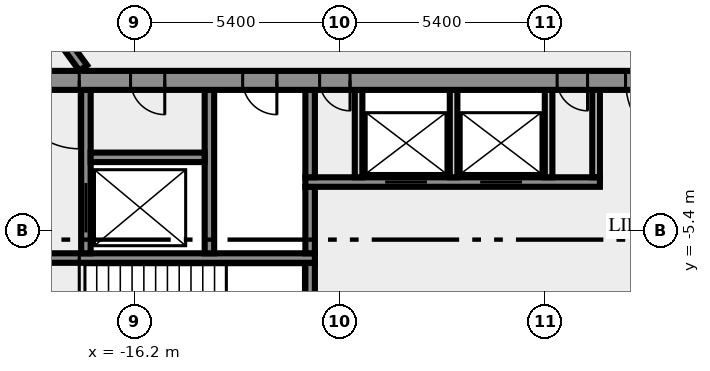
"""IFC4 building model, lengths in metres.
Left out: names, types, materials, properties, quantities, classifications, styles, units other than length and angle.
Written with IfcOpenShell. Run it as: python <this file> out.ifc"""

import sys

from ifc_helpers import new_model, si_unit, direction, frame, frame_2d, origin, place, context, subcontext, project, spatial, rectangle, extrude, element, fill, save


model = new_model("IFC4")
c1 = context("Model", 3, precision=1e-05, world=origin(), true_north=direction((0.0, 1.0)))
c2 = subcontext(c1, "Body", "Model", "MODEL_VIEW")
j1 = project(units=[si_unit("LENGTHUNIT", "METRE"), si_unit("PLANEANGLEUNIT", "RADIAN")], contexts=[c1])
p1 = place(None, origin())
s1 = spatial("IfcSite", under=j1, at=p1, CompositionType="ELEMENT")
p2 = place(p1, origin())
s2 = spatial("IfcBuilding", under=s1, at=p2, CompositionType="ELEMENT")
p3 = place(p2, frame((0.0, 0.0, 293.0)))
s3 = spatial("IfcBuildingStorey", under=s2, at=p3, CompositionType="ELEMENT", Elevation=293.0)
p4 = place(p3, frame((-11.575, -7.25, 0.0), z_axis=(0.0, 0.0, 1.0), x_axis=(0.0, 1.0, 0.0)))
e1 = element("IfcWall", 1, at=p4, inside=s3, PredefinedType="SHEAR", context=c2, shape_type="SweptSolid", body=[
    extrude(rectangle(XDim=1.0, YDim=0.25, at=frame_2d((0.5, 0.0))), origin(), (0.0, 0.0, 1.0), 3.65),
])
p5 = place(p3, frame((-11.45, -6.125, 0.0), z_axis=(0.0, 0.0, 1.0), x_axis=(-1.0, 0.0, 0.0)))
e2 = element("IfcWall", 2, at=p5, inside=s3, PredefinedType="SHEAR", context=c2, shape_type="SweptSolid", body=[
    extrude(rectangle(XDim=8.05, YDim=0.25, at=frame_2d((4.025, 0.0))), origin(), (0.0, 0.0, 1.0), 3.65),
])
p6 = place(p5, frame((6.2, 0.0, 0.0)))
e3 = element("IfcOpeningElement", 3, at=p6, cuts=e2, PredefinedType="OPENING", context=c2, shape_type="SweptSolid", body=[
    extrude(rectangle(XDim=1.8, YDim=2.1, at=frame_2d((0.9, 1.05))), frame((0.0, 0.135, 0.0), z_axis=(0.0, -1.0, 0.0), x_axis=(1.0, 0.0, 0.0)), (0.0, 0.0, 1.0), 0.27),
])
p7 = place(p3, frame((-17.475, -6.0, 0.0), z_axis=(0.0, 0.0, 1.0), x_axis=(0.0, 1.0, 0.0)))
e4 = element("IfcWall", 4, at=p7, inside=s3, PredefinedType="SHEAR", context=c2, shape_type="SweptSolid", body=[
    extrude(rectangle(XDim=4.3, YDim=0.25, at=frame_2d((2.15, 0.0))), origin(), (0.0, 0.0, 1.0), 3.65),
])
p8 = place(p7, frame((0.55, 0.0, 0.0)))
e5 = element("IfcOpeningElement", 5, at=p8, cuts=e4, PredefinedType="OPENING", context=c2, shape_type="SweptSolid", body=[
    extrude(rectangle(XDim=1.3, YDim=2.1, at=frame_2d((0.65, 1.05))), frame((0.0, 0.135, 0.0), z_axis=(0.0, -1.0, 0.0), x_axis=(1.0, 0.0, 0.0)), (0.0, 0.0, 1.0), 0.27),
])
p9 = place(p3, frame((-14.225, -6.0, 0.0), z_axis=(0.0, 0.0, 1.0), x_axis=(0.0, 1.0, 0.0)))
e6 = element("IfcWall", 6, at=p9, inside=s3, PredefinedType="SHEAR", context=c2, shape_type="SweptSolid", body=[
    extrude(rectangle(XDim=4.3, YDim=0.25, at=frame_2d((2.15, 0.0))), origin(), (0.0, 0.0, 1.0), 3.65),
])
p10 = place(p3, frame((-11.575, -6.0, 0.0), z_axis=(0.0, 0.0, 1.0), x_axis=(0.0, 1.0, 0.0)))
e7 = element("IfcWall", 7, at=p10, inside=s3, PredefinedType="SHEAR", context=c2, shape_type="SweptSolid", body=[
    extrude(rectangle(XDim=1.75, YDim=0.25, at=frame_2d((0.875, 0.0))), origin(), (0.0, 0.0, 1.0), 3.65),
])
p11 = place(p3, frame((-11.7, -4.125, 0.0), z_axis=(0.0, 0.0, 1.0), x_axis=(1.0, 0.0, 0.0)))
e8 = element("IfcWall", 8, at=p11, inside=s3, PredefinedType="SHEAR", context=c2, shape_type="SweptSolid", body=[
    extrude(rectangle(XDim=7.75, YDim=0.25, at=frame_2d((3.875, 0.0))), origin(), (0.0, 0.0, 1.0), 3.65),
])
p12 = place(p11, frame((2.1, 0.0, 0.0)))
e9 = element("IfcOpeningElement", 9, at=p12, cuts=e8, PredefinedType="OPENING", context=c2, shape_type="SweptSolid", body=[
    extrude(rectangle(XDim=1.1, YDim=2.1, at=frame_2d((0.55, 1.05))), frame((0.0, 0.135, 0.0), z_axis=(0.0, -1.0, 0.0), x_axis=(1.0, 0.0, 0.0)), (0.0, 0.0, 1.0), 0.27),
])
p13 = place(p11, frame((4.6, 0.0, 0.0)))
e10 = element("IfcOpeningElement", 10, at=p13, cuts=e8, PredefinedType="OPENING", context=c2, shape_type="SweptSolid", body=[
    extrude(rectangle(XDim=1.1, YDim=2.1, at=frame_2d((0.55, 1.05))), frame((0.0, 0.135, 0.0), z_axis=(0.0, -1.0, 0.0), x_axis=(1.0, 0.0, 0.0)), (0.0, 0.0, 1.0), 0.27),
])
p14 = place(p3, frame((-11.575, -4.0, 0.0), z_axis=(0.0, 0.0, 1.0), x_axis=(0.0, 1.0, 0.0)))
e11 = element("IfcWall", 11, at=p14, inside=s3, PredefinedType="SHEAR", context=c2, shape_type="SweptSolid", body=[
    extrude(rectangle(XDim=2.3, YDim=0.25, at=frame_2d((1.15, 0.0))), origin(), (0.0, 0.0, 1.0), 3.65),
])
for number, where, z_axis, x_axis in (
    (12, (-10.3, -4.0, 0.0), (0.0, 0.0, 1.0), (0.0, 1.0, 0.0)),
    (13, (-7.8, -4.0, 0.0), (0.0, 0.0, 1.0), (0.0, 1.0, 0.0)),
    (14, (-5.3, -4.0, 0.0), (0.0, 0.0, 1.0), (0.0, 1.0, 0.0)),
    (15, (-4.05, -4.0, 0.0), (0.0, 0.0, 1.0), (0.0, 1.0, 0.0)),
):
    element("IfcWall", number, at=place(p3, frame(where, z_axis=z_axis, x_axis=x_axis)), inside=s3, PredefinedType="SOLIDWALL", context=c2, shape_type="SweptSolid", body=[
        extrude(rectangle(XDim=2.3, YDim=0.2, at=frame_2d((1.15, 0.0))), origin(), (0.0, 0.0, 1.0), 3.65),
    ])
p15 = place(p3, frame((-17.35, -3.475, 0.0), z_axis=(0.0, 0.0, 1.0), x_axis=(1.0, 0.0, 0.0)))
e16 = element("IfcWall", 16, at=p15, inside=s3, PredefinedType="SHEAR", context=c2, shape_type="SweptSolid", body=[
    extrude(rectangle(XDim=3.0, YDim=0.25, at=frame_2d((1.5, 0.0))), origin(), (0.0, 0.0, 1.0), 3.65),
])
p16 = place(p3, frame((20.49, -1.45, 0.0), z_axis=(0.0, 0.0, 1.0), x_axis=(-1.0, 0.0, 0.0)))
e17 = element("IfcWall", 17, at=p16, inside=s3, PredefinedType="SHEAR", context=c2, shape_type="SweptSolid", body=[
    extrude(rectangle(XDim=40.98, YDim=0.5, at=frame_2d((20.49, 0.0))), origin(), (0.0, 0.0, 1.0), 3.65),
])
p17 = place(p16, frame((38.14, 0.0, 0.0)))
e18 = element("IfcOpeningElement", 18, at=p17, cuts=e17, PredefinedType="OPENING", context=c2, shape_type="SweptSolid", body=[
    extrude(rectangle(XDim=1.8, YDim=2.1, at=frame_2d((0.9, 1.05))), frame((0.0, 0.26, 0.0), z_axis=(0.0, -1.0, 0.0), x_axis=(1.0, 0.0, 0.0)), (0.0, 0.0, 1.0), 0.52),
])
p18 = place(p16, frame((35.89, 0.0, 0.0)))
e19 = element("IfcOpeningElement", 19, at=p18, cuts=e17, PredefinedType="OPENING", context=c2, shape_type="SweptSolid", body=[
    extrude(rectangle(XDim=0.9, YDim=2.1, at=frame_2d((0.45, 1.05))), frame((0.0, 0.26, 0.0), z_axis=(0.0, -1.0, 0.0), x_axis=(1.0, 0.0, 0.0)), (0.0, 0.0, 1.0), 0.52),
])
p19 = place(p16, frame((32.94, 0.0, 0.0)))
e20 = element("IfcOpeningElement", 20, at=p19, cuts=e17, PredefinedType="OPENING", context=c2, shape_type="SweptSolid", body=[
    extrude(rectangle(XDim=0.9, YDim=2.1, at=frame_2d((0.45, 1.05))), frame((0.0, 0.26, 0.0), z_axis=(0.0, -1.0, 0.0), x_axis=(1.0, 0.0, 0.0)), (0.0, 0.0, 1.0), 0.52),
])
p20 = place(p16, frame((31.015, 0.0, 0.0)))
e21 = element("IfcOpeningElement", 21, at=p20, cuts=e17, PredefinedType="OPENING", context=c2, shape_type="SweptSolid", body=[
    extrude(rectangle(XDim=0.8, YDim=2.1, at=frame_2d((0.4, 1.05))), frame((0.0, 0.26, 0.0), z_axis=(0.0, -1.0, 0.0), x_axis=(1.0, 0.0, 0.0)), (0.0, 0.0, 1.0), 0.52),
])
p21 = place(p16, frame((24.765, 0.0, 0.0)))
e22 = element("IfcOpeningElement", 22, at=p21, cuts=e17, PredefinedType="OPENING", context=c2, shape_type="SweptSolid", body=[
    extrude(rectangle(XDim=0.8, YDim=2.1, at=frame_2d((0.4, 1.05))), frame((0.0, 0.26, 0.0), z_axis=(0.0, -1.0, 0.0), x_axis=(1.0, 0.0, 0.0)), (0.0, 0.0, 1.0), 0.52),
])
p22 = place(p16, frame((21.765, 0.0, 0.0)))
e23 = element("IfcOpeningElement", 23, at=p22, cuts=e17, PredefinedType="OPENING", context=c2, shape_type="SweptSolid", body=[
    extrude(rectangle(XDim=2.0, YDim=2.1, at=frame_2d((1.0, 1.05))), frame((0.0, 0.26, 0.0), z_axis=(0.0, -1.0, 0.0), x_axis=(1.0, 0.0, 0.0)), (0.0, 0.0, 1.0), 0.52),
])
p23 = place(p16, frame((15.202, 0.0, 0.0)))
e24 = element("IfcOpeningElement", 24, at=p23, cuts=e17, PredefinedType="OPENING", context=c2, shape_type="SweptSolid", body=[
    extrude(rectangle(XDim=0.9, YDim=2.1, at=frame_2d((0.45, 1.05))), frame((0.0, 0.26, 0.0), z_axis=(0.0, -1.0, 0.0), x_axis=(1.0, 0.0, 0.0)), (0.0, 0.0, 1.0), 0.52),
])
p24 = place(p16, frame((13.54, 0.0, 0.0)))
e25 = element("IfcOpeningElement", 25, at=p24, cuts=e17, PredefinedType="OPENING", context=c2, shape_type="SweptSolid", body=[
    extrude(rectangle(XDim=0.9, YDim=2.1, at=frame_2d((0.45, 1.05))), frame((0.0, 0.26, 0.0), z_axis=(0.0, -1.0, 0.0), x_axis=(1.0, 0.0, 0.0)), (0.0, 0.0, 1.0), 0.52),
])
p25 = place(p16, frame((11.64, 0.0, 0.0)))
e26 = element("IfcOpeningElement", 26, at=p25, cuts=e17, PredefinedType="OPENING", context=c2, shape_type="SweptSolid", body=[
    extrude(rectangle(XDim=0.9, YDim=2.1, at=frame_2d((0.45, 1.05))), frame((0.0, 0.26, 0.0), z_axis=(0.0, -1.0, 0.0), x_axis=(1.0, 0.0, 0.0)), (0.0, 0.0, 1.0), 0.52),
])
p26 = place(p16, frame((9.577, 0.0, 0.0)))
e27 = element("IfcOpeningElement", 27, at=p26, cuts=e17, PredefinedType="OPENING", context=c2, shape_type="SweptSolid", body=[
    extrude(rectangle(XDim=0.9, YDim=2.1, at=frame_2d((0.45, 1.05))), frame((0.0, 0.26, 0.0), z_axis=(0.0, -1.0, 0.0), x_axis=(1.0, 0.0, 0.0)), (0.0, 0.0, 1.0), 0.52),
])
p27 = place(p16, frame((7.14, 0.0, 0.0)))
e28 = element("IfcOpeningElement", 28, at=p27, cuts=e17, PredefinedType="OPENING", context=c2, shape_type="SweptSolid", body=[
    extrude(rectangle(XDim=0.9, YDim=2.1, at=frame_2d((0.45, 1.05))), frame((0.0, 0.26, 0.0), z_axis=(0.0, -1.0, 0.0), x_axis=(1.0, 0.0, 0.0)), (0.0, 0.0, 1.0), 0.52),
])
p28 = place(p16, frame((5.028, 0.0, 0.0)))
e29 = element("IfcOpeningElement", 29, at=p28, cuts=e17, PredefinedType="OPENING", context=c2, shape_type="SweptSolid", body=[
    extrude(rectangle(XDim=0.8, YDim=2.1, at=frame_2d((0.4, 1.05))), frame((0.0, 0.26, 0.0), z_axis=(0.0, -1.0, 0.0), x_axis=(1.0, 0.0, 0.0)), (0.0, 0.0, 1.0), 0.52),
])
p29 = place(p16, frame((3.452, 0.0, 0.0)))
e30 = element("IfcOpeningElement", 30, at=p29, cuts=e17, PredefinedType="OPENING", context=c2, shape_type="SweptSolid", body=[
    extrude(rectangle(XDim=0.8, YDim=2.1, at=frame_2d((0.4, 1.05))), frame((0.0, 0.26, 0.0), z_axis=(0.0, -1.0, 0.0), x_axis=(1.0, 0.0, 0.0)), (0.0, 0.0, 1.0), 0.52),
])
p30 = place(p16, frame((1.04, 0.0, 0.0)))
e31 = element("IfcOpeningElement", 31, at=p30, cuts=e17, PredefinedType="OPENING", context=c2, shape_type="SweptSolid", body=[
    extrude(rectangle(XDim=1.8, YDim=2.1, at=frame_2d((0.9, 1.05))), frame((0.0, 0.26, 0.0), z_axis=(0.0, -1.0, 0.0), x_axis=(1.0, 0.0, 0.0)), (0.0, 0.0, 1.0), 0.52),
])
p31 = place(p3, frame((-24.865, 8.95, 0.0), z_axis=(0.0, 0.0, 1.0), x_axis=(0.587791617212, -0.809012369952, 0.0)))
e32 = element("IfcWall", 32, at=p31, inside=s3, PredefinedType="SOLIDWALL", context=c2, shape_type="SweptSolid", body=[
    extrude(rectangle(XDim=12.453, YDim=0.25, at=frame_2d((6.227, 0.0))), origin(), (0.0, 0.0, 1.0), 3.65),
])
p32 = place(p31, frame((8.112, 0.0, 0.0)))
e33 = element("IfcOpeningElement", 33, at=p32, cuts=e32, PredefinedType="OPENING", context=c2, shape_type="SweptSolid", body=[
    extrude(rectangle(XDim=0.9, YDim=2.1, at=frame_2d((0.45, 1.05))), frame((0.0, 0.135, 0.0), z_axis=(0.0, -1.0, 0.0), x_axis=(1.0, 0.0, 0.0)), (0.0, 0.0, 1.0), 0.27),
])
p33 = place(p6, origin())
e34 = element("IfcDoor", 34, at=p33, inside=s3, OperationType="DOUBLE_DOOR_SINGLE_SWING", PredefinedType="DOOR", context=c2, shape_type="SweptSolid", body=[
    extrude(rectangle(XDim=1.8, YDim=2.1, at=frame_2d((0.9, 1.05))), frame((0.0, 0.025, 0.0), z_axis=(0.0, -1.0, 0.0), x_axis=(1.0, 0.0, 0.0)), (0.0, 0.0, 1.0), 0.05),
])
fill(e3, e34)
p34 = place(p8, origin())
e35 = element("IfcDoor", 35, at=p34, inside=s3, OperationType="DOUBLE_DOOR_SLIDING", PredefinedType="DOOR", context=c2, shape_type="SweptSolid", body=[
    extrude(rectangle(XDim=1.3, YDim=2.1, at=frame_2d((0.65, 1.05))), frame((0.0, 0.025, 0.0), z_axis=(0.0, -1.0, 0.0), x_axis=(1.0, 0.0, 0.0)), (0.0, 0.0, 1.0), 0.05),
])
fill(e5, e35)
p35 = place(p12, origin())
e36 = element("IfcDoor", 36, at=p35, inside=s3, OperationType="DOUBLE_DOOR_SLIDING", PredefinedType="DOOR", context=c2, shape_type="SweptSolid", body=[
    extrude(rectangle(XDim=1.1, YDim=2.1, at=frame_2d((0.55, 1.05))), frame((0.0, 0.025, 0.0), z_axis=(0.0, -1.0, 0.0), x_axis=(1.0, 0.0, 0.0)), (0.0, 0.0, 1.0), 0.05),
])
fill(e9, e36)
p36 = place(p13, origin())
e37 = element("IfcDoor", 37, at=p36, inside=s3, OperationType="DOUBLE_DOOR_SLIDING", PredefinedType="DOOR", context=c2, shape_type="SweptSolid", body=[
    extrude(rectangle(XDim=1.1, YDim=2.1, at=frame_2d((0.55, 1.05))), frame((0.0, 0.025, 0.0), z_axis=(0.0, -1.0, 0.0), x_axis=(1.0, 0.0, 0.0)), (0.0, 0.0, 1.0), 0.05),
])
fill(e10, e37)
p37 = place(p17, origin())
e38 = element("IfcDoor", 38, at=p37, inside=s3, OperationType="DOUBLE_DOOR_SINGLE_SWING", PredefinedType="DOOR", context=c2, shape_type="SweptSolid", body=[
    extrude(rectangle(XDim=1.8, YDim=2.1, at=frame_2d((0.9, 1.05))), frame((0.0, 0.025, 0.0), z_axis=(0.0, -1.0, 0.0), x_axis=(1.0, 0.0, 0.0)), (0.0, 0.0, 1.0), 0.05),
])
fill(e18, e38)
p38 = place(p18, origin())
e39 = element("IfcDoor", 39, at=p38, inside=s3, OperationType="SINGLE_SWING_RIGHT", PredefinedType="DOOR", context=c2, shape_type="SweptSolid", body=[
    extrude(rectangle(XDim=0.9, YDim=2.1, at=frame_2d((0.45, 1.05))), frame((0.0, 0.025, 0.0), z_axis=(0.0, -1.0, 0.0), x_axis=(1.0, 0.0, 0.0)), (0.0, 0.0, 1.0), 0.05),
])
fill(e19, e39)
p39 = place(p19, origin())
e40 = element("IfcDoor", 40, at=p39, inside=s3, OperationType="SINGLE_SWING_RIGHT", PredefinedType="DOOR", context=c2, shape_type="SweptSolid", body=[
    extrude(rectangle(XDim=0.9, YDim=2.1, at=frame_2d((0.45, 1.05))), frame((0.0, 0.025, 0.0), z_axis=(0.0, -1.0, 0.0), x_axis=(1.0, 0.0, 0.0)), (0.0, 0.0, 1.0), 0.05),
])
fill(e20, e40)
p40 = place(p20, origin())
e41 = element("IfcDoor", 41, at=p40, inside=s3, OperationType="SINGLE_SWING_RIGHT", PredefinedType="DOOR", context=c2, shape_type="SweptSolid", body=[
    extrude(rectangle(XDim=0.8, YDim=2.1, at=frame_2d((0.4, 1.05))), frame((0.0, 0.025, 0.0), z_axis=(0.0, -1.0, 0.0), x_axis=(1.0, 0.0, 0.0)), (0.0, 0.0, 1.0), 0.05),
])
fill(e21, e41)
p41 = place(p21, origin())
e42 = element("IfcDoor", 42, at=p41, inside=s3, OperationType="SINGLE_SWING_RIGHT", PredefinedType="DOOR", context=c2, shape_type="SweptSolid", body=[
    extrude(rectangle(XDim=0.8, YDim=2.1, at=frame_2d((0.4, 1.05))), frame((0.0, 0.025, 0.0), z_axis=(0.0, -1.0, 0.0), x_axis=(1.0, 0.0, 0.0)), (0.0, 0.0, 1.0), 0.05),
])
fill(e22, e42)
p42 = place(p22, origin())
e43 = element("IfcDoor", 43, at=p42, inside=s3, OperationType="DOUBLE_DOOR_SINGLE_SWING", PredefinedType="DOOR", context=c2, shape_type="SweptSolid", body=[
    extrude(rectangle(XDim=2.0, YDim=2.1, at=frame_2d((1.0, 1.05))), frame((0.0, 0.025, 0.0), z_axis=(0.0, -1.0, 0.0), x_axis=(1.0, 0.0, 0.0)), (0.0, 0.0, 1.0), 0.05),
])
fill(e23, e43)
save(model, sys.argv[1])
